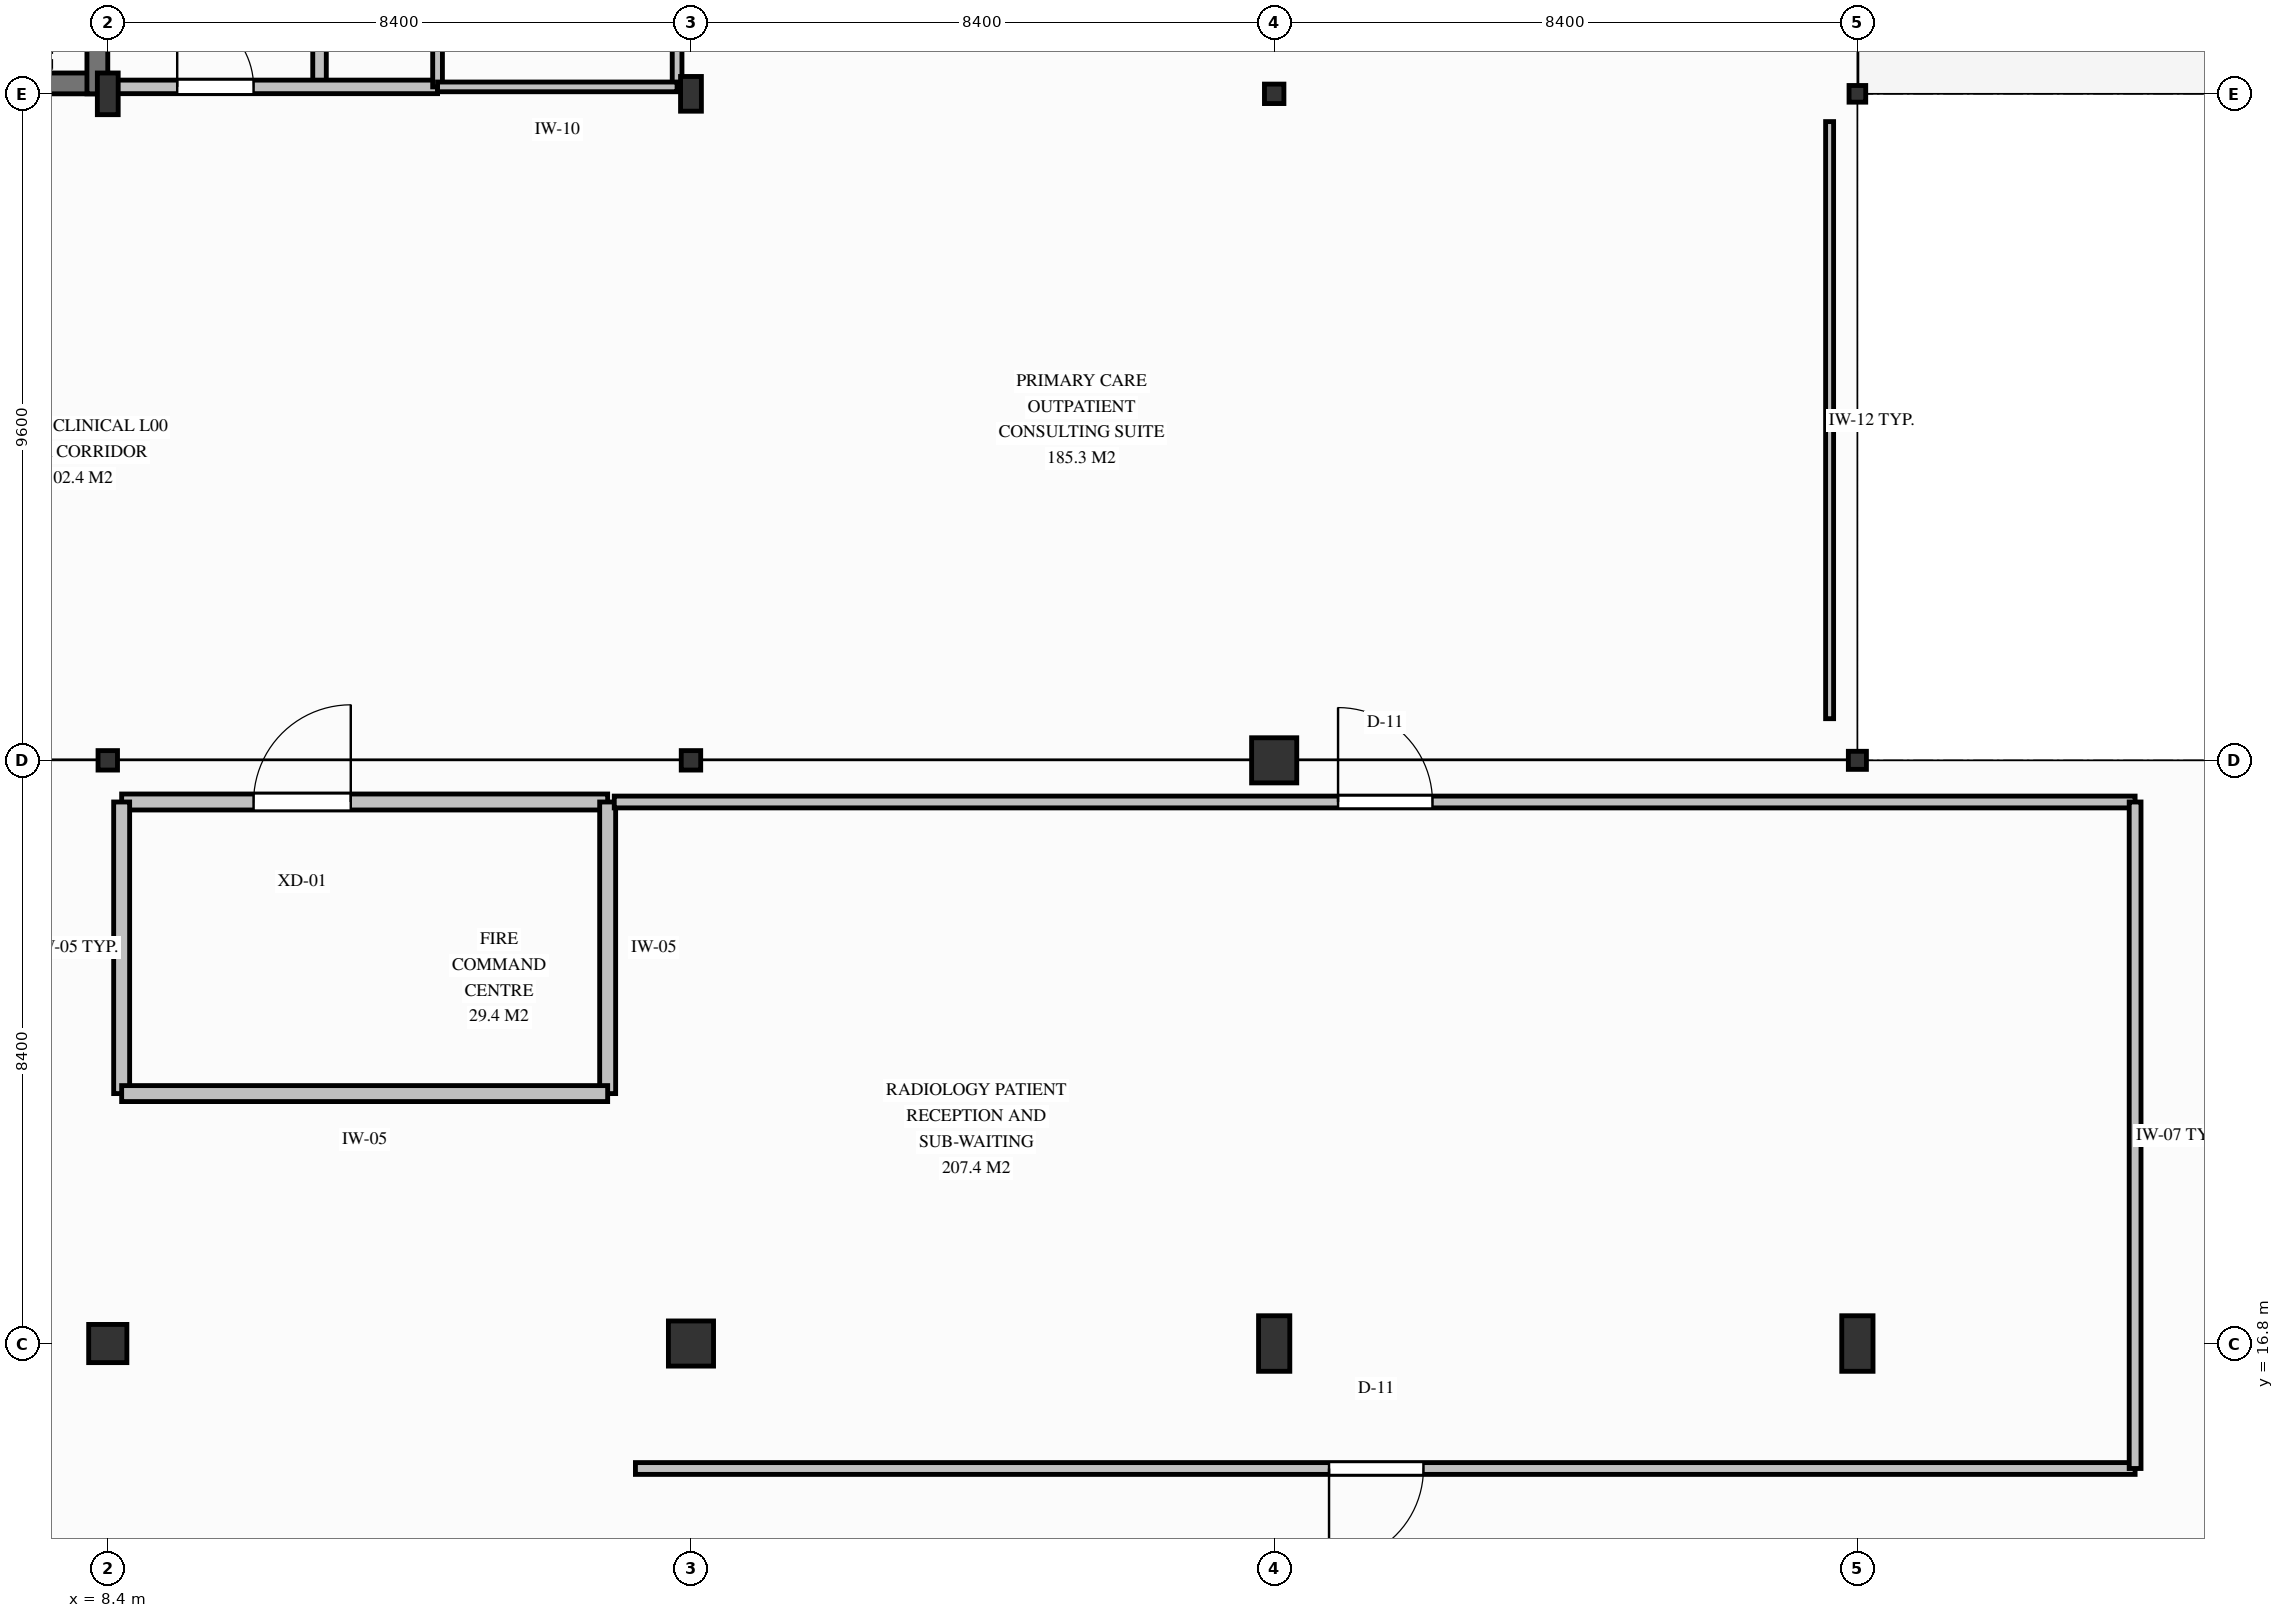
"""IFC4 building model, lengths in metres.
Left out: names, types, materials, properties, quantities, classifications, styles, units other than length and angle.
Written with IfcOpenShell. Run it as: python <this file> out.ifc"""

import sys

from ifc_helpers import new_model, si_unit, direction, frame, frame_2d, origin, origin_2d, place, context, subcontext, project, spatial, rectangle, circle, i_section, extrude, element, fill, save


model = new_model("IFC4")
c1 = context("Model", 3, precision=1e-05, world=origin(), true_north=direction((0.0, 1.0)))
c2 = subcontext(c1, "Body", "Model", "MODEL_VIEW")
j1 = project(units=[si_unit("LENGTHUNIT", "METRE"), si_unit("PLANEANGLEUNIT", "RADIAN")], contexts=[c1])
p1 = place(None, origin())
s1 = spatial("IfcSite", under=j1, at=p1, CompositionType="ELEMENT")
p2 = place(p1, origin())
s2 = spatial("IfcBuilding", under=s1, at=p2, CompositionType="ELEMENT")
p3 = place(p2, origin())
s3 = spatial("IfcBuildingStorey", under=s2, at=p3, CompositionType="ELEMENT", Elevation=0.0)
p4 = place(p3, frame((0.0, 34.95, 0.0), z_axis=(0.0, 0.0, 1.0), x_axis=(1.0, 0.0, 0.0)))
e1 = element("IfcWall", 1, at=p4, inside=s3, PredefinedType="SHEAR", context=c2, shape_type="SweptSolid", body=[
    extrude(rectangle(XDim=8.4, YDim=0.3, at=frame_2d((4.2, 0.0))), origin(), (0.0, 0.0, 1.0), 4.5),
])
p5 = place(p4, frame((3.35, 0.0, 0.0)))
e2 = element("IfcOpeningElement", 2, at=p5, cuts=e1, PredefinedType="OPENING", context=c2, shape_type="SweptSolid", body=[
    extrude(rectangle(XDim=1.1, YDim=2.1, at=frame_2d((0.55, 1.05))), frame((0.0, 0.16, 0.0), z_axis=(0.0, -1.0, 0.0), x_axis=(1.0, 0.0, 0.0)), (0.0, 0.0, 1.0), 0.32),
])
p6 = place(p3, frame((8.25, 34.8, 0.0), z_axis=(0.0, 0.0, 1.0), x_axis=(0.0, 1.0, 0.0)))
e3 = element("IfcWall", 3, at=p6, inside=s3, PredefinedType="SHEAR", context=c2, shape_type="SweptSolid", body=[
    extrude(rectangle(XDim=8.0, YDim=0.3, at=frame_2d((4.0, 0.0))), origin(), (0.0, 0.0, 1.0), 4.5),
])
p7 = place(p6, frame((2.95, 0.0, 0.0)))
e4 = element("IfcOpeningElement", 4, at=p7, cuts=e3, PredefinedType="OPENING", context=c2, shape_type="SweptSolid", body=[
    extrude(rectangle(XDim=1.1, YDim=2.15, at=frame_2d((0.55, 1.075))), frame((0.0, 0.16, 0.0), z_axis=(0.0, -1.0, 0.0), x_axis=(1.0, 0.0, 0.0)), (0.0, 0.0, 1.0), 0.32),
])
p8 = place(p6, frame((1.0, 0.0, 0.0)))
e5 = element("IfcOpeningElement", 5, at=p8, cuts=e3, PredefinedType="OPENING", context=c2, shape_type="SweptSolid", body=[
    extrude(rectangle(XDim=1.1, YDim=2.1, at=frame_2d((0.55, 1.05))), frame((0.0, 0.16, 0.0), z_axis=(0.0, -1.0, 0.0), x_axis=(1.0, 0.0, 0.0)), (0.0, 0.0, 1.0), 0.32),
])
p9 = place(p3, frame((8.4, 16.8, 0.0), z_axis=(0.0, 0.0, 1.0), x_axis=(1.0, 0.0, 0.0)))
e6 = element("IfcColumn", 6, at=p9, inside=s3, PredefinedType="COLUMN", context=c2, shape_type="SweptSolid", body=[
    extrude(circle(Radius=0.275, at=origin_2d()), origin(), (0.0, 0.0, 1.0), 4.5),
])
p10 = place(p3, frame((8.4, 25.2, 0.0), z_axis=(0.0, 0.0, 1.0), x_axis=(1.0, 0.0, 0.0)))
e7 = element("IfcColumn", 7, at=p10, inside=s3, PredefinedType="COLUMN", context=c2, shape_type="SweptSolid", body=[
    extrude(i_section(OverallWidth=0.28, OverallDepth=0.28, WebThickness=0.01, FlangeThickness=0.018, FilletRadius=0.024, at=origin_2d()), origin(), (0.0, 0.0, 1.0), 4.5),
])
p11 = place(p3, frame((8.4, 34.8, 0.0), z_axis=(0.0, 0.0, 1.0), x_axis=(1.0, 0.0, 0.0)))
e8 = element("IfcColumn", 8, at=p11, inside=s3, PredefinedType="COLUMN", context=c2, shape_type="SweptSolid", body=[
    extrude(i_section(OverallWidth=0.3, OverallDepth=0.6, WebThickness=0.015, FlangeThickness=0.03, FilletRadius=0.027, at=origin_2d()), origin(), (0.0, 0.0, 1.0), 4.5),
])
p12 = place(p3, frame((16.8, 16.8, 0.0), z_axis=(0.0, 0.0, 1.0), x_axis=(1.0, 0.0, 0.0)))
e9 = element("IfcColumn", 9, at=p12, inside=s3, PredefinedType="COLUMN", context=c2, shape_type="SweptSolid", body=[
    extrude(circle(Radius=0.325, at=origin_2d()), origin(), (0.0, 0.0, 1.0), 4.5),
])
p13 = place(p3, frame((16.8, 25.2, 0.0), z_axis=(0.0, 0.0, 1.0), x_axis=(1.0, 0.0, 0.0)))
e10 = element("IfcColumn", 10, at=p13, inside=s3, PredefinedType="COLUMN", context=c2, shape_type="SweptSolid", body=[
    extrude(i_section(OverallWidth=0.28, OverallDepth=0.28, WebThickness=0.01, FlangeThickness=0.018, FilletRadius=0.024, at=origin_2d()), origin(), (0.0, 0.0, 1.0), 4.5),
])
p14 = place(p3, frame((16.8, 34.8, 0.0), z_axis=(0.0, 0.0, 1.0), x_axis=(1.0, 0.0, 0.0)))
e11 = element("IfcColumn", 11, at=p14, inside=s3, PredefinedType="COLUMN", context=c2, shape_type="SweptSolid", body=[
    extrude(i_section(OverallWidth=0.3, OverallDepth=0.5, WebThickness=0.014, FlangeThickness=0.028, FilletRadius=0.027, at=origin_2d()), origin(), (0.0, 0.0, 1.0), 4.5),
])
p15 = place(p3, frame((25.2, 16.8, 0.0), z_axis=(0.0, 0.0, 1.0), x_axis=(1.0, 0.0, 0.0)))
e12 = element("IfcColumn", 12, at=p15, inside=s3, PredefinedType="COLUMN", context=c2, shape_type="SweptSolid", body=[
    extrude(rectangle(XDim=0.45, YDim=0.8, at=origin_2d()), origin(), (0.0, 0.0, 1.0), 4.5),
])
p16 = place(p3, frame((25.2, 25.2, 0.0), z_axis=(0.0, 0.0, 1.0), x_axis=(1.0, 0.0, 0.0)))
e13 = element("IfcColumn", 13, at=p16, inside=s3, PredefinedType="COLUMN", context=c2, shape_type="SweptSolid", body=[
    extrude(circle(Radius=0.325, at=origin_2d()), origin(), (0.0, 0.0, 1.0), 4.5),
])
p17 = place(p3, frame((25.2, 34.8, 0.0), z_axis=(0.0, 0.0, 1.0), x_axis=(1.0, 0.0, 0.0)))
e14 = element("IfcColumn", 14, at=p17, inside=s3, PredefinedType="COLUMN", context=c2, shape_type="SweptSolid", body=[
    extrude(i_section(OverallWidth=0.28, OverallDepth=0.28, WebThickness=0.01, FlangeThickness=0.018, FilletRadius=0.024, at=origin_2d()), origin(), (0.0, 0.0, 1.0), 4.5),
])
p18 = place(p3, frame((33.6, 16.8, 0.0), z_axis=(0.0, 0.0, 1.0), x_axis=(1.0, 0.0, 0.0)))
e15 = element("IfcColumn", 15, at=p18, inside=s3, PredefinedType="COLUMN", context=c2, shape_type="SweptSolid", body=[
    extrude(rectangle(XDim=0.45, YDim=0.8, at=origin_2d()), origin(), (0.0, 0.0, 1.0), 4.5),
])
p19 = place(p3, frame((33.6, 25.2, 0.0), z_axis=(0.0, 0.0, 1.0), x_axis=(1.0, 0.0, 0.0)))
e16 = element("IfcColumn", 16, at=p19, inside=s3, PredefinedType="COLUMN", context=c2, shape_type="SweptSolid", body=[
    extrude(i_section(OverallWidth=0.26, OverallDepth=0.26, WebThickness=0.01, FlangeThickness=0.018, FilletRadius=0.024, at=origin_2d()), origin(), (0.0, 0.0, 1.0), 4.5),
])
p20 = place(p3, frame((33.6, 34.8, 0.0), z_axis=(0.0, 0.0, 1.0), x_axis=(1.0, 0.0, 0.0)))
e17 = element("IfcColumn", 17, at=p20, inside=s3, PredefinedType="COLUMN", context=c2, shape_type="SweptSolid", body=[
    extrude(i_section(OverallWidth=0.24, OverallDepth=0.24, WebThickness=0.01, FlangeThickness=0.017, FilletRadius=0.021, at=origin_2d()), origin(), (0.0, 0.0, 1.0), 4.5),
])
p21 = place(p3, frame((11.45, 34.9, 0.0), z_axis=(0.0, 0.0, 1.0), x_axis=(0.0, 1.0, 0.0)))
e18 = element("IfcWall", 18, at=p21, inside=s3, PredefinedType="PARTITIONING", context=c2, shape_type="SweptSolid", body=[
    extrude(rectangle(XDim=2.65, YDim=0.195, at=frame_2d((1.325, 0.0))), origin(), (0.0, 0.0, 1.0), 3.928),
])
p22 = place(p3, frame((8.35, 34.9, 0.0), z_axis=(0.0, 0.0, 1.0), x_axis=(1.0, 0.0, 0.0)))
e19 = element("IfcWall", 19, at=p22, inside=s3, PredefinedType="PARTITIONING", context=c2, shape_type="SweptSolid", body=[
    extrude(rectangle(XDim=4.8, YDim=0.195, at=frame_2d((2.4, 0.0))), origin(), (0.0, 0.0, 1.0), 3.678),
])
p23 = place(p22, frame((1.05, 0.0, 0.0)))
e20 = element("IfcOpeningElement", 20, at=p23, cuts=e19, PredefinedType="OPENING", context=c2, shape_type="SweptSolid", body=[
    extrude(rectangle(XDim=1.1, YDim=2.15, at=frame_2d((0.55, 1.075))), frame((0.0, 0.107, 0.0), z_axis=(0.0, -1.0, 0.0), x_axis=(1.0, 0.0, 0.0)), (0.0, 0.0, 1.0), 0.215),
])
p24 = place(p3, frame((13.15, 34.9, 0.0), z_axis=(0.0, 0.0, 1.0), x_axis=(0.0, 1.0, 0.0)))
e21 = element("IfcWall", 21, at=p24, inside=s3, PredefinedType="PARTITIONING", context=c2, shape_type="SweptSolid", body=[
    extrude(rectangle(XDim=7.82, YDim=0.14, at=frame_2d((3.91, 0.0))), origin(), (0.0, 0.0, 1.0), 3.928),
])
p25 = place(p24, frame((0.9, 0.0, 0.0)))
e22 = element("IfcOpeningElement", 22, at=p25, cuts=e21, PredefinedType="OPENING", context=c2, shape_type="SweptSolid", body=[
    extrude(rectangle(XDim=0.95, YDim=2.12, at=frame_2d((0.475, 1.06))), frame((0.0, 0.08, 0.0), z_axis=(0.0, -1.0, 0.0), x_axis=(1.0, 0.0, 0.0)), (0.0, 0.0, 1.0), 0.16),
])
p26 = place(p24, frame((3.55, 0.0, 0.0)))
e23 = element("IfcOpeningElement", 23, at=p26, cuts=e21, PredefinedType="OPENING", context=c2, shape_type="SweptSolid", body=[
    extrude(rectangle(XDim=0.98, YDim=2.14, at=frame_2d((0.49, 1.07))), frame((0.0, 0.08, 0.0), z_axis=(0.0, -1.0, 0.0), x_axis=(1.0, 0.0, 0.0)), (0.0, 0.0, 1.0), 0.16),
])
p27 = place(p24, frame((6.08, 0.0, 0.0)))
e24 = element("IfcOpeningElement", 24, at=p27, cuts=e21, PredefinedType="OPENING", context=c2, shape_type="SweptSolid", body=[
    extrude(rectangle(XDim=0.98, YDim=2.14, at=frame_2d((0.49, 1.07))), frame((0.0, 0.08, 0.0), z_axis=(0.0, -1.0, 0.0), x_axis=(1.0, 0.0, 0.0)), (0.0, 0.0, 1.0), 0.16),
])
p28 = place(p3, frame((16.6, 34.9, 0.0), z_axis=(0.0, 0.0, 1.0), x_axis=(0.0, 1.0, 0.0)))
e25 = element("IfcWall", 25, at=p28, inside=s3, PredefinedType="PARTITIONING", context=c2, shape_type="SweptSolid", body=[
    extrude(rectangle(XDim=7.82, YDim=0.14, at=frame_2d((3.91, 0.0))), origin(), (0.0, 0.0, 1.0), 3.728),
])
p29 = place(p3, frame((13.15, 34.9, 0.0), z_axis=(0.0, 0.0, 1.0), x_axis=(1.0, 0.0, 0.0)))
e26 = element("IfcWall", 26, at=p29, inside=s3, PredefinedType="PARTITIONING", context=c2, shape_type="SweptSolid", body=[
    extrude(rectangle(XDim=3.45, YDim=0.14, at=frame_2d((1.725, 0.0))), origin(), (0.0, 0.0, 1.0), 3.728),
])
p30 = place(p3, frame((8.6, 24.6, 0.0), z_axis=(0.0, 0.0, 1.0), x_axis=(1.0, 0.0, 0.0)))
e27 = element("IfcWall", 27, at=p30, inside=s3, PredefinedType="PARTITIONING", context=c2, shape_type="SweptSolid", body=[
    extrude(rectangle(XDim=7.0, YDim=0.23, at=frame_2d((3.5, 0.0))), origin(), (0.0, 0.0, 1.0), 3.933),
])
p31 = place(p30, frame((1.9, 0.0, 0.0)))
e28 = element("IfcOpeningElement", 28, at=p31, cuts=e27, PredefinedType="OPENING", context=c2, shape_type="SweptSolid", body=[
    extrude(rectangle(XDim=1.4, YDim=2.2, at=frame_2d((0.7, 1.1))), frame((0.0, 0.125, 0.0), z_axis=(0.0, -1.0, 0.0), x_axis=(1.0, 0.0, 0.0)), (0.0, 0.0, 1.0), 0.25),
])
p32 = place(p3, frame((8.6, 20.4, 0.0), z_axis=(0.0, 0.0, 1.0), x_axis=(0.0, 1.0, 0.0)))
e29 = element("IfcWall", 29, at=p32, inside=s3, PredefinedType="PARTITIONING", context=c2, shape_type="SweptSolid", body=[
    extrude(rectangle(XDim=4.2, YDim=0.23, at=frame_2d((2.1, 0.0))), origin(), (0.0, 0.0, 1.0), 3.933),
])
p33 = place(p3, frame((15.6, 24.6, 0.0), z_axis=(0.0, 0.0, 1.0), x_axis=(0.0, -1.0, 0.0)))
e30 = element("IfcWall", 30, at=p33, inside=s3, PredefinedType="PARTITIONING", context=c2, shape_type="SweptSolid", body=[
    extrude(rectangle(XDim=4.2, YDim=0.23, at=frame_2d((2.1, 0.0))), origin(), (0.0, 0.0, 1.0), 4.013),
])
p34 = place(p3, frame((15.6, 20.4, 0.0), z_axis=(0.0, 0.0, 1.0), x_axis=(-1.0, 0.0, 0.0)))
e31 = element("IfcWall", 31, at=p34, inside=s3, PredefinedType="PARTITIONING", context=c2, shape_type="SweptSolid", body=[
    extrude(rectangle(XDim=7.0, YDim=0.23, at=frame_2d((3.5, 0.0))), origin(), (0.0, 0.0, 1.0), 3.933),
])
p35 = place(p3, frame((37.6, 15.0, 0.0), z_axis=(0.0, 0.0, 1.0), x_axis=(-1.0, 0.0, 0.0)))
e32 = element("IfcWall", 32, at=p35, inside=s3, PredefinedType="PARTITIONING", context=c2, shape_type="SweptSolid", body=[
    extrude(rectangle(XDim=21.6, YDim=0.17, at=frame_2d((10.8, 0.0))), origin(), (0.0, 0.0, 1.0), 3.613),
])
p36 = place(p35, frame((10.25, 0.0, 0.0)))
e33 = element("IfcOpeningElement", 33, at=p36, cuts=e32, PredefinedType="OPENING", context=c2, shape_type="SweptSolid", body=[
    extrude(rectangle(XDim=1.36, YDim=2.2, at=frame_2d((0.68, 1.1))), frame((0.0, 0.095, 0.0), z_axis=(0.0, -1.0, 0.0), x_axis=(1.0, 0.0, 0.0)), (0.0, 0.0, 1.0), 0.19),
])
p37 = place(p3, frame((15.695, 24.6, 0.0), z_axis=(0.0, 0.0, 1.0), x_axis=(1.0, 0.0, 0.0)))
e34 = element("IfcWall", 34, at=p37, inside=s3, PredefinedType="PARTITIONING", context=c2, shape_type="SweptSolid", body=[
    extrude(rectangle(XDim=21.905, YDim=0.17, at=frame_2d((10.953, 0.0))), origin(), (0.0, 0.0, 1.0), 3.763),
])
p38 = place(p37, frame((10.425, 0.0, 0.0)))
e35 = element("IfcOpeningElement", 35, at=p38, cuts=e34, PredefinedType="OPENING", context=c2, shape_type="SweptSolid", body=[
    extrude(rectangle(XDim=1.36, YDim=2.2, at=frame_2d((0.68, 1.1))), frame((0.0, 0.095, 0.0), z_axis=(0.0, -1.0, 0.0), x_axis=(1.0, 0.0, 0.0)), (0.0, 0.0, 1.0), 0.19),
])
p39 = place(p3, frame((37.6, 24.6, 0.0), z_axis=(0.0, 0.0, 1.0), x_axis=(0.0, -1.0, 0.0)))
e36 = element("IfcWall", 36, at=p39, inside=s3, PredefinedType="PARTITIONING", context=c2, shape_type="SweptSolid", body=[
    extrude(rectangle(XDim=9.6, YDim=0.17, at=frame_2d((4.8, 0.0))), origin(), (0.0, 0.0, 1.0), 3.763),
])
p40 = place(p3, frame((33.2, 34.4, 0.0), z_axis=(0.0, 0.0, 1.0), x_axis=(0.0, -1.0, 0.0)))
e37 = element("IfcWall", 37, at=p40, inside=s3, PredefinedType="PARTITIONING", context=c2, shape_type="SweptSolid", body=[
    extrude(rectangle(XDim=8.6, YDim=0.115, at=frame_2d((4.3, 0.0))), origin(), (0.0, 0.0, 1.0), 4.23),
])
p41 = place(p23, origin())
e38 = element("IfcDoor", 38, at=p41, inside=s3, OperationType="SINGLE_SWING_LEFT", PredefinedType="DOOR", context=c2, shape_type="SweptSolid", body=[
    extrude(rectangle(XDim=1.1, YDim=2.15, at=frame_2d((0.55, 1.075))), frame((0.0, 0.025, 0.0), z_axis=(0.0, -1.0, 0.0), x_axis=(1.0, 0.0, 0.0)), (0.0, 0.0, 1.0), 0.05),
])
fill(e20, e38)
p42 = place(p31, origin())
e39 = element("IfcDoor", 39, at=p42, inside=s3, OperationType="SINGLE_SWING_RIGHT", PredefinedType="DOOR", context=c2, shape_type="SweptSolid", body=[
    extrude(rectangle(XDim=1.4, YDim=2.2, at=frame_2d((0.7, 1.1))), frame((0.0, 0.025, 0.0), z_axis=(0.0, -1.0, 0.0), x_axis=(1.0, 0.0, 0.0)), (0.0, 0.0, 1.0), 0.05),
])
fill(e28, e39)
p43 = place(p36, origin())
e40 = element("IfcDoor", 40, at=p43, inside=s3, OperationType="SINGLE_SWING_RIGHT", PredefinedType="DOOR", context=c2, shape_type="SweptSolid", body=[
    extrude(rectangle(XDim=1.36, YDim=2.2, at=frame_2d((0.68, 1.1))), frame((0.0, 0.025, 0.0), z_axis=(0.0, -1.0, 0.0), x_axis=(1.0, 0.0, 0.0)), (0.0, 0.0, 1.0), 0.05),
])
fill(e33, e40)
p44 = place(p38, origin())
e41 = element("IfcDoor", 41, at=p44, inside=s3, OperationType="SINGLE_SWING_LEFT", PredefinedType="DOOR", context=c2, shape_type="SweptSolid", body=[
    extrude(rectangle(XDim=1.36, YDim=2.2, at=frame_2d((0.68, 1.1))), frame((0.0, 0.025, 0.0), z_axis=(0.0, -1.0, 0.0), x_axis=(1.0, 0.0, 0.0)), (0.0, 0.0, 1.0), 0.05),
])
fill(e35, e41)
save(model, sys.argv[1])
